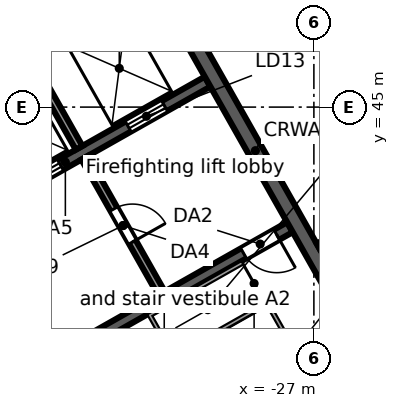
"""IFC4 building model, lengths in metres.
Left out: names, types, materials, properties, quantities, classifications, styles, units other than length and angle.
Written with IfcOpenShell. Run it as: python <this file> out.ifc"""

import sys

from ifc_helpers import new_model, si_unit, direction, frame, frame_2d, origin, place, context, subcontext, project, spatial, rectangle, extrude, element, fill, save


model = new_model("IFC4")
c1 = context("Model", 3, precision=1e-05, world=origin(), true_north=direction((0.0, 1.0)))
c2 = subcontext(c1, "Body", "Model", "MODEL_VIEW")
j1 = project(units=[si_unit("LENGTHUNIT", "METRE"), si_unit("PLANEANGLEUNIT", "RADIAN")], contexts=[c1])
p1 = place(None, origin())
s1 = spatial("IfcSite", under=j1, at=p1, CompositionType="ELEMENT")
p2 = place(p1, origin())
s2 = spatial("IfcBuilding", under=s1, at=p2, CompositionType="ELEMENT")
p3 = place(p2, frame((0.0, 0.0, 304.5)))
s3 = spatial("IfcBuildingStorey", under=s2, at=p3, CompositionType="ELEMENT", Elevation=304.5)
p4 = place(p3, frame((-58.732, 38.771, 0.0), z_axis=(0.0, 0.0, 1.0), x_axis=(0.870355615581, 0.492423702137, 0.0)))
e1 = element("IfcWall", 1, at=p4, inside=s3, PredefinedType="STANDARD", context=c2, shape_type="SweptSolid", body=[
    extrude(rectangle(XDim=64.052, YDim=0.25, at=frame_2d((32.026, 0.0))), origin(), (0.0, 0.0, 1.0), 3.52),
])
p5 = place(p4, frame((61.259, 0.0, 0.8)))
e2 = element("IfcOpeningElement", 2, at=p5, cuts=e1, PredefinedType="OPENING", context=c2, shape_type="SweptSolid", body=[
    extrude(rectangle(XDim=2.4, YDim=2.2, at=frame_2d((1.2, 1.1))), frame((0.0, 0.135, 0.0), z_axis=(0.0, -1.0, 0.0), x_axis=(1.0, 0.0, 0.0)), (0.0, 0.0, 1.0), 0.27),
])
p6 = place(p4, frame((58.216, 0.0, 0.8)))
e3 = element("IfcOpeningElement", 3, at=p6, cuts=e1, PredefinedType="OPENING", context=c2, shape_type="SweptSolid", body=[
    extrude(rectangle(XDim=2.4, YDim=2.2, at=frame_2d((1.2, 1.1))), frame((0.0, 0.135, 0.0), z_axis=(0.0, -1.0, 0.0), x_axis=(1.0, 0.0, 0.0)), (0.0, 0.0, 1.0), 0.27),
])
p7 = place(p4, frame((55.173, 0.0, 0.8)))
e4 = element("IfcOpeningElement", 4, at=p7, cuts=e1, PredefinedType="OPENING", context=c2, shape_type="SweptSolid", body=[
    extrude(rectangle(XDim=2.4, YDim=2.2, at=frame_2d((1.2, 1.1))), frame((0.0, 0.135, 0.0), z_axis=(0.0, -1.0, 0.0), x_axis=(1.0, 0.0, 0.0)), (0.0, 0.0, 1.0), 0.27),
])
p8 = place(p4, frame((52.129, 0.0, 0.8)))
e5 = element("IfcOpeningElement", 5, at=p8, cuts=e1, PredefinedType="OPENING", context=c2, shape_type="SweptSolid", body=[
    extrude(rectangle(XDim=2.4, YDim=2.2, at=frame_2d((1.2, 1.1))), frame((0.0, 0.135, 0.0), z_axis=(0.0, -1.0, 0.0), x_axis=(1.0, 0.0, 0.0)), (0.0, 0.0, 1.0), 0.27),
])
p9 = place(p4, frame((49.086, 0.0, 0.8)))
e6 = element("IfcOpeningElement", 6, at=p9, cuts=e1, PredefinedType="OPENING", context=c2, shape_type="SweptSolid", body=[
    extrude(rectangle(XDim=2.4, YDim=2.2, at=frame_2d((1.2, 1.1))), frame((0.0, 0.135, 0.0), z_axis=(0.0, -1.0, 0.0), x_axis=(1.0, 0.0, 0.0)), (0.0, 0.0, 1.0), 0.27),
])
p10 = place(p4, frame((46.043, 0.0, 0.8)))
e7 = element("IfcOpeningElement", 7, at=p10, cuts=e1, PredefinedType="OPENING", context=c2, shape_type="SweptSolid", body=[
    extrude(rectangle(XDim=2.4, YDim=2.2, at=frame_2d((1.2, 1.1))), frame((0.0, 0.135, 0.0), z_axis=(0.0, -1.0, 0.0), x_axis=(1.0, 0.0, 0.0)), (0.0, 0.0, 1.0), 0.27),
])
p11 = place(p4, frame((43.0, 0.0, 0.8)))
e8 = element("IfcOpeningElement", 8, at=p11, cuts=e1, PredefinedType="OPENING", context=c2, shape_type="SweptSolid", body=[
    extrude(rectangle(XDim=2.4, YDim=2.2, at=frame_2d((1.2, 1.1))), frame((0.0, 0.135, 0.0), z_axis=(0.0, -1.0, 0.0), x_axis=(1.0, 0.0, 0.0)), (0.0, 0.0, 1.0), 0.27),
])
p12 = place(p4, frame((39.956, 0.0, 0.8)))
e9 = element("IfcOpeningElement", 9, at=p12, cuts=e1, PredefinedType="OPENING", context=c2, shape_type="SweptSolid", body=[
    extrude(rectangle(XDim=2.4, YDim=2.2, at=frame_2d((1.2, 1.1))), frame((0.0, 0.135, 0.0), z_axis=(0.0, -1.0, 0.0), x_axis=(1.0, 0.0, 0.0)), (0.0, 0.0, 1.0), 0.27),
])
p13 = place(p4, frame((36.913, 0.0, 0.8)))
e10 = element("IfcOpeningElement", 10, at=p13, cuts=e1, PredefinedType="OPENING", context=c2, shape_type="SweptSolid", body=[
    extrude(rectangle(XDim=2.4, YDim=2.2, at=frame_2d((1.2, 1.1))), frame((0.0, 0.135, 0.0), z_axis=(0.0, -1.0, 0.0), x_axis=(1.0, 0.0, 0.0)), (0.0, 0.0, 1.0), 0.27),
])
p14 = place(p4, frame((33.87, 0.0, 0.8)))
e11 = element("IfcOpeningElement", 11, at=p14, cuts=e1, PredefinedType="OPENING", context=c2, shape_type="SweptSolid", body=[
    extrude(rectangle(XDim=2.4, YDim=2.2, at=frame_2d((1.2, 1.1))), frame((0.0, 0.135, 0.0), z_axis=(0.0, -1.0, 0.0), x_axis=(1.0, 0.0, 0.0)), (0.0, 0.0, 1.0), 0.27),
])
p15 = place(p4, frame((30.826, 0.0, 0.8)))
e12 = element("IfcOpeningElement", 12, at=p15, cuts=e1, PredefinedType="OPENING", context=c2, shape_type="SweptSolid", body=[
    extrude(rectangle(XDim=2.4, YDim=2.2, at=frame_2d((1.2, 1.1))), frame((0.0, 0.135, 0.0), z_axis=(0.0, -1.0, 0.0), x_axis=(1.0, 0.0, 0.0)), (0.0, 0.0, 1.0), 0.27),
])
p16 = place(p4, frame((27.783, 0.0, 0.8)))
e13 = element("IfcOpeningElement", 13, at=p16, cuts=e1, PredefinedType="OPENING", context=c2, shape_type="SweptSolid", body=[
    extrude(rectangle(XDim=2.4, YDim=2.2, at=frame_2d((1.2, 1.1))), frame((0.0, 0.135, 0.0), z_axis=(0.0, -1.0, 0.0), x_axis=(1.0, 0.0, 0.0)), (0.0, 0.0, 1.0), 0.27),
])
p17 = place(p4, frame((24.74, 0.0, 0.8)))
e14 = element("IfcOpeningElement", 14, at=p17, cuts=e1, PredefinedType="OPENING", context=c2, shape_type="SweptSolid", body=[
    extrude(rectangle(XDim=2.4, YDim=2.2, at=frame_2d((1.2, 1.1))), frame((0.0, 0.135, 0.0), z_axis=(0.0, -1.0, 0.0), x_axis=(1.0, 0.0, 0.0)), (0.0, 0.0, 1.0), 0.27),
])
p18 = place(p4, frame((21.696, 0.0, 0.8)))
e15 = element("IfcOpeningElement", 15, at=p18, cuts=e1, PredefinedType="OPENING", context=c2, shape_type="SweptSolid", body=[
    extrude(rectangle(XDim=2.4, YDim=2.2, at=frame_2d((1.2, 1.1))), frame((0.0, 0.135, 0.0), z_axis=(0.0, -1.0, 0.0), x_axis=(1.0, 0.0, 0.0)), (0.0, 0.0, 1.0), 0.27),
])
p19 = place(p4, frame((18.653, 0.0, 0.8)))
e16 = element("IfcOpeningElement", 16, at=p19, cuts=e1, PredefinedType="OPENING", context=c2, shape_type="SweptSolid", body=[
    extrude(rectangle(XDim=2.4, YDim=2.2, at=frame_2d((1.2, 1.1))), frame((0.0, 0.135, 0.0), z_axis=(0.0, -1.0, 0.0), x_axis=(1.0, 0.0, 0.0)), (0.0, 0.0, 1.0), 0.27),
])
p20 = place(p4, frame((15.61, 0.0, 0.8)))
e17 = element("IfcOpeningElement", 17, at=p20, cuts=e1, PredefinedType="OPENING", context=c2, shape_type="SweptSolid", body=[
    extrude(rectangle(XDim=2.4, YDim=2.2, at=frame_2d((1.2, 1.1))), frame((0.0, 0.135, 0.0), z_axis=(0.0, -1.0, 0.0), x_axis=(1.0, 0.0, 0.0)), (0.0, 0.0, 1.0), 0.27),
])
p21 = place(p4, frame((12.567, 0.0, 0.8)))
e18 = element("IfcOpeningElement", 18, at=p21, cuts=e1, PredefinedType="OPENING", context=c2, shape_type="SweptSolid", body=[
    extrude(rectangle(XDim=2.4, YDim=2.2, at=frame_2d((1.2, 1.1))), frame((0.0, 0.135, 0.0), z_axis=(0.0, -1.0, 0.0), x_axis=(1.0, 0.0, 0.0)), (0.0, 0.0, 1.0), 0.27),
])
p22 = place(p4, frame((9.523, 0.0, 0.8)))
e19 = element("IfcOpeningElement", 19, at=p22, cuts=e1, PredefinedType="OPENING", context=c2, shape_type="SweptSolid", body=[
    extrude(rectangle(XDim=2.4, YDim=2.2, at=frame_2d((1.2, 1.1))), frame((0.0, 0.135, 0.0), z_axis=(0.0, -1.0, 0.0), x_axis=(1.0, 0.0, 0.0)), (0.0, 0.0, 1.0), 0.27),
])
p23 = place(p4, frame((6.48, 0.0, 0.8)))
e20 = element("IfcOpeningElement", 20, at=p23, cuts=e1, PredefinedType="OPENING", context=c2, shape_type="SweptSolid", body=[
    extrude(rectangle(XDim=2.4, YDim=2.2, at=frame_2d((1.2, 1.1))), frame((0.0, 0.135, 0.0), z_axis=(0.0, -1.0, 0.0), x_axis=(1.0, 0.0, 0.0)), (0.0, 0.0, 1.0), 0.27),
])
p24 = place(p4, frame((3.437, 0.0, 0.8)))
e21 = element("IfcOpeningElement", 21, at=p24, cuts=e1, PredefinedType="OPENING", context=c2, shape_type="SweptSolid", body=[
    extrude(rectangle(XDim=2.4, YDim=2.2, at=frame_2d((1.2, 1.1))), frame((0.0, 0.135, 0.0), z_axis=(0.0, -1.0, 0.0), x_axis=(1.0, 0.0, 0.0)), (0.0, 0.0, 1.0), 0.27),
])
p25 = place(p4, frame((0.393, 0.0, 0.8)))
e22 = element("IfcOpeningElement", 22, at=p25, cuts=e1, PredefinedType="OPENING", context=c2, shape_type="SweptSolid", body=[
    extrude(rectangle(XDim=2.4, YDim=2.2, at=frame_2d((1.2, 1.1))), frame((0.0, 0.135, 0.0), z_axis=(0.0, -1.0, 0.0), x_axis=(1.0, 0.0, 0.0)), (0.0, 0.0, 1.0), 0.27),
])
p26 = place(p3, frame((-3.017, 46.293, 0.0), z_axis=(0.0, 0.0, 1.0), x_axis=(-0.870355474887, -0.492423950812, 0.0)))
e23 = element("IfcWall", 23, at=p26, inside=s3, PredefinedType="STANDARD", context=c2, shape_type="SweptSolid", body=[
    extrude(rectangle(XDim=40.34, YDim=0.25, at=frame_2d((20.17, 0.0))), origin(), (0.0, 0.0, 1.0), 3.52),
])
p27 = place(p26, frame((37.428, 0.0, 0.8)))
e24 = element("IfcOpeningElement", 24, at=p27, cuts=e23, PredefinedType="OPENING", context=c2, shape_type="SweptSolid", body=[
    extrude(rectangle(XDim=2.4, YDim=2.2, at=frame_2d((1.2, 1.1))), frame((0.0, 0.135, 0.0), z_axis=(0.0, -1.0, 0.0), x_axis=(1.0, 0.0, 0.0)), (0.0, 0.0, 1.0), 0.27),
])
p28 = place(p26, frame((34.372, 0.0, 0.0)))
e25 = element("IfcOpeningElement", 25, at=p28, cuts=e23, PredefinedType="OPENING", context=c2, shape_type="SweptSolid", body=[
    extrude(rectangle(XDim=1.8, YDim=2.4, at=frame_2d((0.9, 1.2))), frame((0.0, 0.135, 0.0), z_axis=(0.0, -1.0, 0.0), x_axis=(1.0, 0.0, 0.0)), (0.0, 0.0, 1.0), 0.27),
])
p29 = place(p26, frame((30.716, 0.0, 0.8)))
e26 = element("IfcOpeningElement", 26, at=p29, cuts=e23, PredefinedType="OPENING", context=c2, shape_type="SweptSolid", body=[
    extrude(rectangle(XDim=2.4, YDim=2.2, at=frame_2d((1.2, 1.1))), frame((0.0, 0.135, 0.0), z_axis=(0.0, -1.0, 0.0), x_axis=(1.0, 0.0, 0.0)), (0.0, 0.0, 1.0), 0.27),
])
p30 = place(p26, frame((27.36, 0.0, 0.8)))
e27 = element("IfcOpeningElement", 27, at=p30, cuts=e23, PredefinedType="OPENING", context=c2, shape_type="SweptSolid", body=[
    extrude(rectangle(XDim=2.4, YDim=2.2, at=frame_2d((1.2, 1.1))), frame((0.0, 0.135, 0.0), z_axis=(0.0, -1.0, 0.0), x_axis=(1.0, 0.0, 0.0)), (0.0, 0.0, 1.0), 0.27),
])
p31 = place(p26, frame((24.304, 0.0, 0.0)))
e28 = element("IfcOpeningElement", 28, at=p31, cuts=e23, PredefinedType="OPENING", context=c2, shape_type="SweptSolid", body=[
    extrude(rectangle(XDim=1.8, YDim=2.4, at=frame_2d((0.9, 1.2))), frame((0.0, 0.135, 0.0), z_axis=(0.0, -1.0, 0.0), x_axis=(1.0, 0.0, 0.0)), (0.0, 0.0, 1.0), 0.27),
])
p32 = place(p26, frame((20.648, 0.0, 0.8)))
e29 = element("IfcOpeningElement", 29, at=p32, cuts=e23, PredefinedType="OPENING", context=c2, shape_type="SweptSolid", body=[
    extrude(rectangle(XDim=2.4, YDim=2.2, at=frame_2d((1.2, 1.1))), frame((0.0, 0.135, 0.0), z_axis=(0.0, -1.0, 0.0), x_axis=(1.0, 0.0, 0.0)), (0.0, 0.0, 1.0), 0.27),
])
p33 = place(p26, frame((17.292, 0.0, 0.8)))
e30 = element("IfcOpeningElement", 30, at=p33, cuts=e23, PredefinedType="OPENING", context=c2, shape_type="SweptSolid", body=[
    extrude(rectangle(XDim=2.4, YDim=2.2, at=frame_2d((1.2, 1.1))), frame((0.0, 0.135, 0.0), z_axis=(0.0, -1.0, 0.0), x_axis=(1.0, 0.0, 0.0)), (0.0, 0.0, 1.0), 0.27),
])
p34 = place(p26, frame((14.236, 0.0, 0.0)))
e31 = element("IfcOpeningElement", 31, at=p34, cuts=e23, PredefinedType="OPENING", context=c2, shape_type="SweptSolid", body=[
    extrude(rectangle(XDim=1.8, YDim=2.4, at=frame_2d((0.9, 1.2))), frame((0.0, 0.135, 0.0), z_axis=(0.0, -1.0, 0.0), x_axis=(1.0, 0.0, 0.0)), (0.0, 0.0, 1.0), 0.27),
])
p35 = place(p26, frame((10.58, 0.0, 0.8)))
e32 = element("IfcOpeningElement", 32, at=p35, cuts=e23, PredefinedType="OPENING", context=c2, shape_type="SweptSolid", body=[
    extrude(rectangle(XDim=2.4, YDim=2.2, at=frame_2d((1.2, 1.1))), frame((0.0, 0.135, 0.0), z_axis=(0.0, -1.0, 0.0), x_axis=(1.0, 0.0, 0.0)), (0.0, 0.0, 1.0), 0.27),
])
p36 = place(p26, frame((7.224, 0.0, 0.8)))
e33 = element("IfcOpeningElement", 33, at=p36, cuts=e23, PredefinedType="OPENING", context=c2, shape_type="SweptSolid", body=[
    extrude(rectangle(XDim=2.4, YDim=2.2, at=frame_2d((1.2, 1.1))), frame((0.0, 0.135, 0.0), z_axis=(0.0, -1.0, 0.0), x_axis=(1.0, 0.0, 0.0)), (0.0, 0.0, 1.0), 0.27),
])
p37 = place(p26, frame((4.168, 0.0, 0.0)))
e34 = element("IfcOpeningElement", 34, at=p37, cuts=e23, PredefinedType="OPENING", context=c2, shape_type="SweptSolid", body=[
    extrude(rectangle(XDim=1.8, YDim=2.4, at=frame_2d((0.9, 1.2))), frame((0.0, 0.135, 0.0), z_axis=(0.0, -1.0, 0.0), x_axis=(1.0, 0.0, 0.0)), (0.0, 0.0, 1.0), 0.27),
])
p38 = place(p26, frame((0.512, 0.0, 0.8)))
e35 = element("IfcOpeningElement", 35, at=p38, cuts=e23, PredefinedType="OPENING", context=c2, shape_type="SweptSolid", body=[
    extrude(rectangle(XDim=2.4, YDim=2.2, at=frame_2d((1.2, 1.1))), frame((0.0, 0.135, 0.0), z_axis=(0.0, -1.0, 0.0), x_axis=(1.0, 0.0, 0.0)), (0.0, 0.0, 1.0), 0.27),
])
p39 = place(p3, frame((-34.245, 38.097, 0.0), z_axis=(0.0, 0.0, 1.0), x_axis=(0.870356351998, 0.492422400523, 0.0)))
e36 = element("IfcWall", 36, at=p39, inside=s3, PredefinedType="SOLIDWALL", context=c2, shape_type="SweptSolid", body=[
    extrude(rectangle(XDim=7.6, YDim=0.3, at=frame_2d((3.8, 0.0))), origin(), (0.0, 0.0, 1.0), 3.52),
])
p40 = place(p39, frame((6.2, 0.0, 0.0)))
e37 = element("IfcOpeningElement", 37, at=p40, cuts=e36, PredefinedType="OPENING", context=c2, shape_type="SweptSolid", body=[
    extrude(rectangle(XDim=1.0, YDim=2.1, at=frame_2d((0.5, 1.05))), frame((0.0, 0.16, 0.0), z_axis=(0.0, -1.0, 0.0), x_axis=(1.0, 0.0, 0.0)), (0.0, 0.0, 1.0), 0.32),
])
p41 = place(p3, frame((-37.282, 41.435, 0.0), z_axis=(0.0, 0.0, 1.0), x_axis=(0.870361315115, 0.492413628113, 0.0)))
e38 = element("IfcWall", 38, at=p41, inside=s3, PredefinedType="SOLIDWALL", context=c2, shape_type="SweptSolid", body=[
    extrude(rectangle(XDim=8.6, YDim=0.3, at=frame_2d((4.3, 0.0))), origin(), (0.0, 0.0, 1.0), 3.52),
])
p42 = place(p41, frame((0.65, 0.0, 0.0)))
e39 = element("IfcOpeningElement", 39, at=p42, cuts=e38, PredefinedType="OPENING", context=c2, shape_type="SweptSolid", body=[
    extrude(rectangle(XDim=1.1, YDim=2.1, at=frame_2d((0.55, 1.05))), frame((0.0, 0.16, 0.0), z_axis=(0.0, -1.0, 0.0), x_axis=(1.0, 0.0, 0.0)), (0.0, 0.0, 1.0), 0.32),
])
p43 = place(p41, frame((3.05, 0.0, 0.0)))
e40 = element("IfcOpeningElement", 40, at=p43, cuts=e38, PredefinedType="OPENING", context=c2, shape_type="SweptSolid", body=[
    extrude(rectangle(XDim=1.1, YDim=2.1, at=frame_2d((0.55, 1.05))), frame((0.0, 0.16, 0.0), z_axis=(0.0, -1.0, 0.0), x_axis=(1.0, 0.0, 0.0)), (0.0, 0.0, 1.0), 0.32),
])
p44 = place(p41, frame((6.2, 0.0, 0.0)))
e41 = element("IfcOpeningElement", 41, at=p44, cuts=e38, PredefinedType="OPENING", context=c2, shape_type="SweptSolid", body=[
    extrude(rectangle(XDim=1.1, YDim=2.1, at=frame_2d((0.55, 1.05))), frame((0.0, 0.16, 0.0), z_axis=(0.0, -1.0, 0.0), x_axis=(1.0, 0.0, 0.0)), (0.0, 0.0, 1.0), 0.32),
])
p45 = place(p3, frame((-46.51, 41.499, 0.0), z_axis=(0.0, 0.0, 1.0), x_axis=(0.870356271124, 0.492422543467, 0.0)))
e42 = element("IfcWall", 42, at=p45, inside=s3, PredefinedType="SOLIDWALL", context=c2, shape_type="SweptSolid", body=[
    extrude(rectangle(XDim=17.0, YDim=0.4, at=frame_2d((8.5, 0.0))), origin(), (0.0, 0.0, 1.0), 3.52),
])
p46 = place(p3, frame((-33.031, 43.667, 0.0), z_axis=(0.0, 0.0, 1.0), x_axis=(0.492408451753, -0.87036424366, 0.0)))
e43 = element("IfcWall", 43, at=p46, inside=s3, PredefinedType="PARTITIONING", context=c2, shape_type="SweptSolid", body=[
    extrude(rectangle(XDim=4.1, YDim=0.2, at=frame_2d((2.05, 0.0))), origin(), (0.0, 0.0, 1.0), 3.52),
])
p47 = place(p46, frame((1.55, 0.0, 0.0)))
e44 = element("IfcOpeningElement", 44, at=p47, cuts=e43, PredefinedType="OPENING", context=c2, shape_type="SweptSolid", body=[
    extrude(rectangle(XDim=1.0, YDim=2.1, at=frame_2d((0.5, 1.05))), frame((0.0, 0.11, 0.0), z_axis=(0.0, -1.0, 0.0), x_axis=(1.0, 0.0, 0.0)), (0.0, 0.0, 1.0), 0.22),
])
p48 = place(p3, frame((-35.271, 47.628, 0.0), z_axis=(0.0, 0.0, 1.0), x_axis=(0.492422543467, -0.870356271124, 0.0)))
e45 = element("IfcWall", 45, at=p48, inside=s3, PredefinedType="SOLIDWALL", context=c2, shape_type="SweptSolid", body=[
    extrude(rectangle(XDim=4.25, YDim=0.2, at=frame_2d((2.125, 0.0))), origin(), (0.0, 0.0, 1.0), 3.52),
])
p49 = place(p3, frame((-31.79, 49.597, 0.0), z_axis=(0.0, 0.0, 1.0), x_axis=(0.492421663121, -0.870356769198, 0.0)))
e46 = element("IfcWall", 46, at=p49, inside=s3, PredefinedType="SOLIDWALL", context=c2, shape_type="SweptSolid", body=[
    extrude(rectangle(XDim=13.2, YDim=0.4, at=frame_2d((6.6, 0.0))), origin(), (0.0, 0.0, 1.0), 3.52),
])
p50 = place(p3, frame((-26.888, 41.34, 0.0), z_axis=(0.0, 0.0, 1.0), x_axis=(0.8702292093, 0.492647057518, 0.0)))
e47 = element("IfcWall", 47, at=p50, inside=s3, PredefinedType="PARTITIONING", context=c2, shape_type="SweptSolid", body=[
    extrude(rectangle(XDim=3.0, YDim=0.15, at=frame_2d((1.5, 0.0))), origin(), (0.0, 0.0, 1.0), 2.792),
])
p51 = place(p43, origin())
e48 = element("IfcDoor", 48, at=p51, inside=s3, OperationType="DOUBLE_DOOR_SLIDING", PredefinedType="DOOR", context=c2, shape_type="SweptSolid", body=[
    extrude(rectangle(XDim=1.1, YDim=2.1, at=frame_2d((0.55, 1.05))), frame((0.0, 0.025, 0.0), z_axis=(0.0, -1.0, 0.0), x_axis=(1.0, 0.0, 0.0)), (0.0, 0.0, 1.0), 0.05),
])
fill(e40, e48)
p52 = place(p44, origin())
e49 = element("IfcDoor", 49, at=p52, inside=s3, OperationType="DOUBLE_DOOR_SLIDING", PredefinedType="DOOR", context=c2, shape_type="SweptSolid", body=[
    extrude(rectangle(XDim=1.1, YDim=2.1, at=frame_2d((0.55, 1.05))), frame((0.0, 0.025, 0.0), z_axis=(0.0, -1.0, 0.0), x_axis=(1.0, 0.0, 0.0)), (0.0, 0.0, 1.0), 0.05),
])
fill(e41, e49)
p53 = place(p40, frame((1.0, 0.0, 0.0), z_axis=(0.0, 0.0, 1.0), x_axis=(-1.0, 0.0, 0.0)))
e50 = element("IfcDoor", 50, at=p53, inside=s3, OperationType="SINGLE_SWING_LEFT", PredefinedType="DOOR", context=c2, shape_type="SweptSolid", body=[
    extrude(rectangle(XDim=1.0, YDim=2.1, at=frame_2d((0.5, 1.05))), frame((0.0, 0.025, 0.0), z_axis=(0.0, -1.0, 0.0), x_axis=(1.0, 0.0, 0.0)), (0.0, 0.0, 1.0), 0.05),
])
fill(e37, e50)
p54 = place(p47, origin())
e51 = element("IfcDoor", 51, at=p54, inside=s3, OperationType="SINGLE_SWING_RIGHT", PredefinedType="DOOR", context=c2, shape_type="SweptSolid", body=[
    extrude(rectangle(XDim=1.0, YDim=2.1, at=frame_2d((0.5, 1.05))), frame((0.0, 0.025, 0.0), z_axis=(0.0, -1.0, 0.0), x_axis=(1.0, 0.0, 0.0)), (0.0, 0.0, 1.0), 0.05),
])
fill(e44, e51)
save(model, sys.argv[1])
